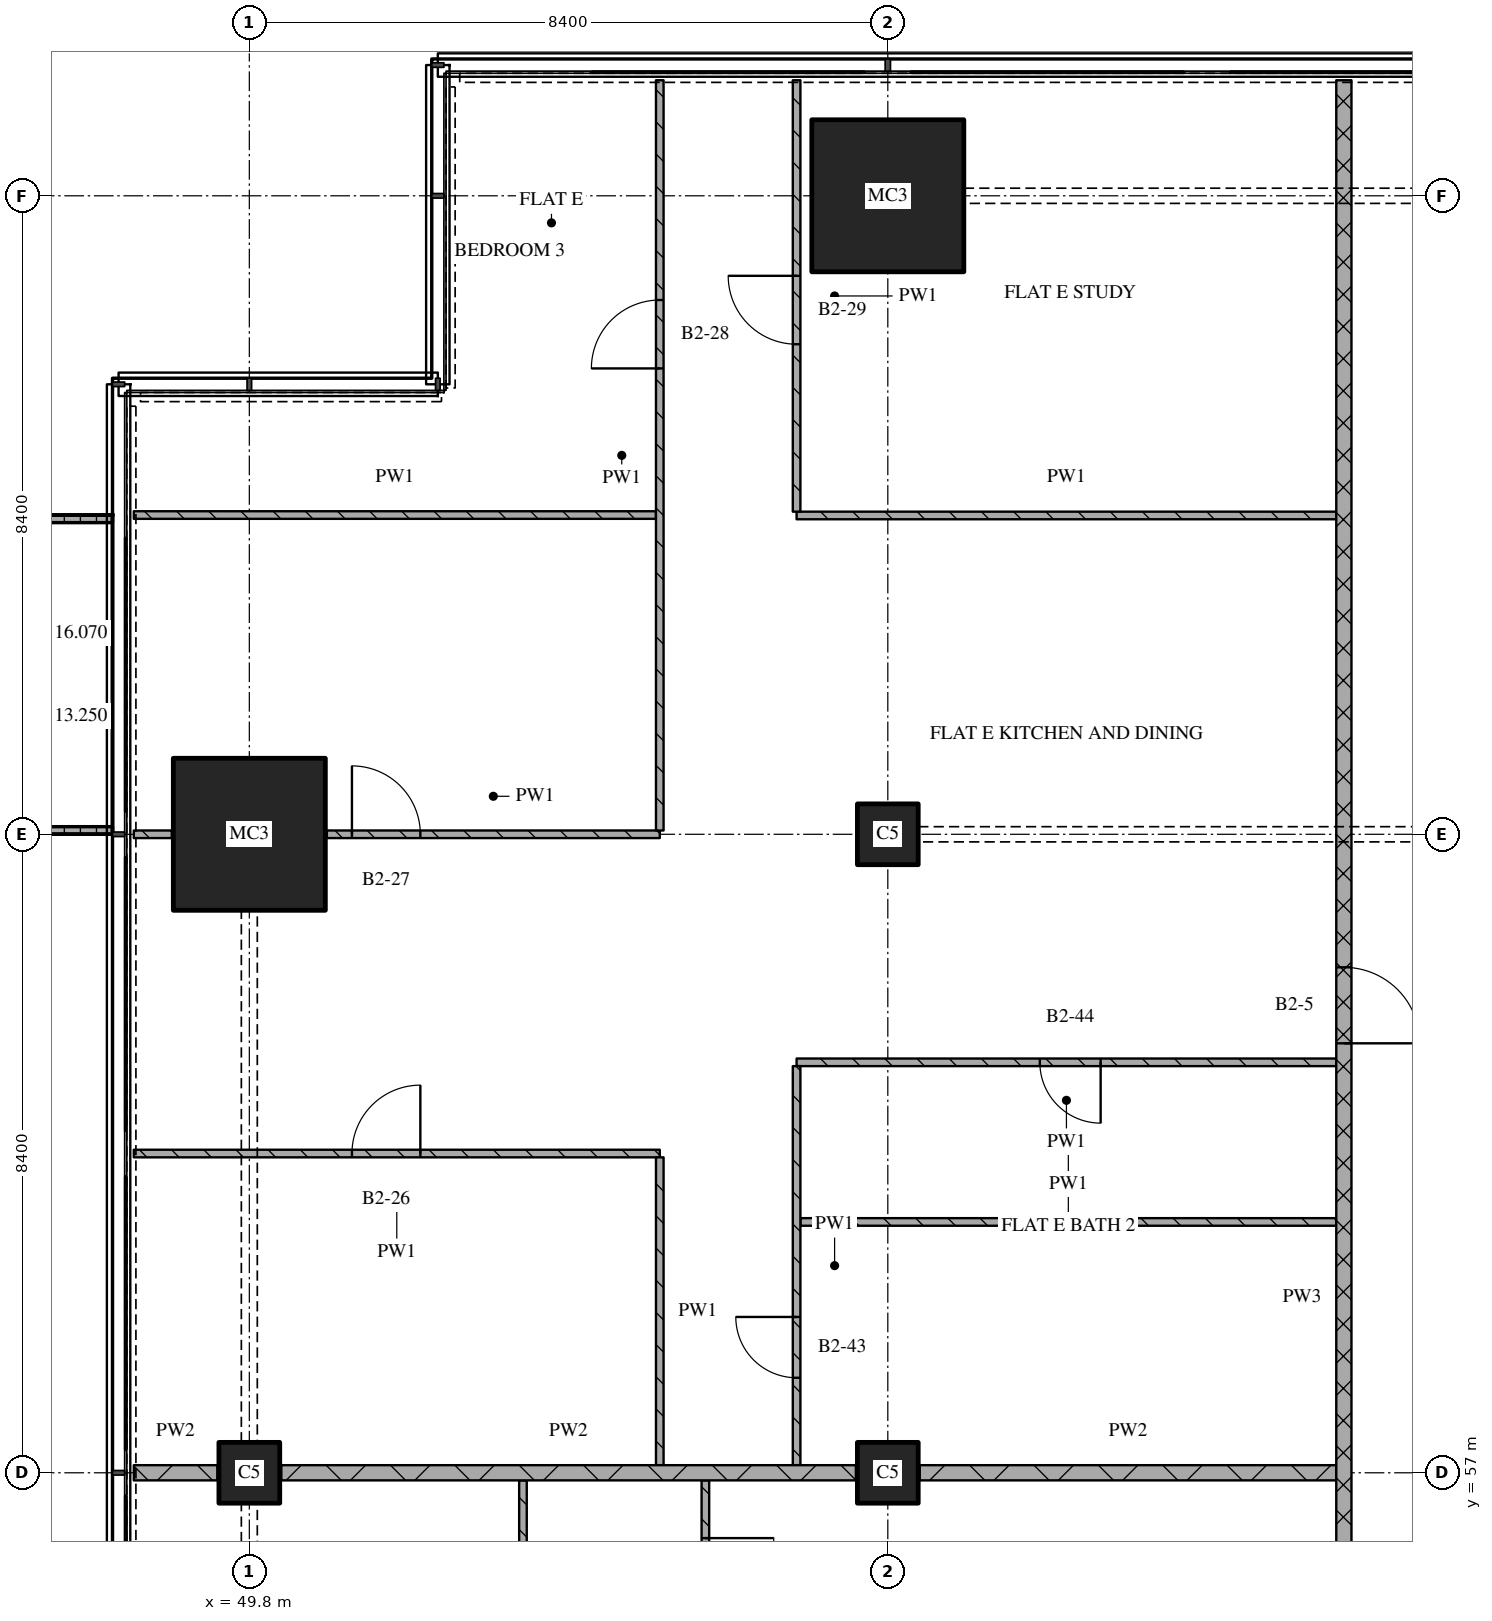
"""IFC4 building model, lengths in metres.
Left out: names, types, materials, properties, quantities, classifications, styles, units other than length and angle.
Written with IfcOpenShell. Run it as: python <this file> out.ifc"""

import sys

from ifc_helpers import new_model, si_unit, direction, frame, frame_2d, origin, origin_2d, place, context, subcontext, project, spatial, polyline, rectangle, outline, extrude, element, fill, save


model = new_model("IFC4")
c1 = context("Model", 3, precision=1e-05, world=origin(), true_north=direction((0.0, 1.0)))
c2 = subcontext(c1, "Body", "Model", "MODEL_VIEW")
j1 = project(units=[si_unit("LENGTHUNIT", "METRE"), si_unit("PLANEANGLEUNIT", "RADIAN")], contexts=[c1])
p1 = place(None, origin())
s1 = spatial("IfcSite", under=j1, at=p1, CompositionType="ELEMENT")
p2 = place(p1, origin())
s2 = spatial("IfcBuilding", under=s1, at=p2, CompositionType="ELEMENT")
p3 = place(p2, frame((0.0, 0.0, 113.25)))
s3 = spatial("IfcBuildingStorey", under=s2, at=p3, CompositionType="ELEMENT", Elevation=113.25)
p4 = place(p3, frame((49.8, 57.0, 0.0), z_axis=(0.0, 0.0, 1.0), x_axis=(1.0, 0.0, 0.0)))
e1 = element("IfcColumn", 1, at=p4, inside=s3, PredefinedType="COLUMN", context=c2, shape_type="SweptSolid", body=[
    extrude(rectangle(XDim=0.8, YDim=0.8, at=origin_2d()), origin(), (0.0, 0.0, 1.0), 3.6),
])
p5 = place(p3, frame((49.8, 65.4, 0.0), z_axis=(0.0, 0.0, 1.0), x_axis=(1.0, 0.0, 0.0)))
e2 = element("IfcColumn", 2, at=p5, inside=s3, PredefinedType="COLUMN", context=c2, shape_type="SweptSolid", body=[
    extrude(rectangle(XDim=2.0, YDim=2.0, at=origin_2d()), origin(), (0.0, 0.0, 1.0), 3.6),
])
for number, where, z_axis, x_axis in (
    (3, (58.2, 57.0, 0.0), (0.0, 0.0, 1.0), (1.0, 0.0, 0.0)),
    (4, (58.2, 65.4, 0.0), (0.0, 0.0, 1.0), (1.0, 0.0, 0.0)),
):
    element("IfcColumn", number, at=place(p3, frame(where, z_axis=z_axis, x_axis=x_axis)), inside=s3, PredefinedType="COLUMN", context=c2, shape_type="SweptSolid", body=[
        extrude(rectangle(XDim=0.8, YDim=0.8, at=origin_2d()), origin(), (0.0, 0.0, 1.0), 3.6),
    ])
p6 = place(p3, frame((58.2, 73.8, 0.0), z_axis=(0.0, 0.0, 1.0), x_axis=(1.0, 0.0, 0.0)))
e5 = element("IfcColumn", 5, at=p6, inside=s3, PredefinedType="COLUMN", context=c2, shape_type="SweptSolid", body=[
    extrude(rectangle(XDim=2.0, YDim=2.0, at=origin_2d()), origin(), (0.0, 0.0, 1.0), 3.6),
])
p7 = place(p3, origin())
e6 = element("IfcWall", 6, at=p7, inside=s3, PredefinedType="SOLIDWALL", context=c2, shape_type="SweptSolid", body=[
    extrude(outline(polyline([(48.0, 69.6), (48.0, 69.5), (46.367, 69.5), (46.367, 65.5), (48.0, 65.5), (48.0, 65.4), (46.267, 65.4), (46.267, 69.6), (48.0, 69.6)])), origin(), (0.0, 0.0, 1.0), 1.0),
])
p8 = place(p3, frame((48.28, 57.0, 0.0), z_axis=(0.0, 0.0, 1.0), x_axis=(1.0, 0.0, 0.0)))
e7 = element("IfcWall", 7, at=p8, inside=s3, PredefinedType="PARTITIONING", context=c2, shape_type="SweptSolid", body=[
    extrude(rectangle(XDim=1.1, YDim=0.2, at=frame_2d((0.55, 0.0))), origin(), (0.0, 0.0, 1.0), 3.32),
])
p9 = place(p3, frame((50.22, 57.0, 0.0), z_axis=(0.0, 0.0, 1.0), x_axis=(1.0, 0.0, 0.0)))
e8 = element("IfcWall", 8, at=p9, inside=s3, PredefinedType="PARTITIONING", context=c2, shape_type="SweptSolid", body=[
    extrude(rectangle(XDim=7.56, YDim=0.2, at=frame_2d((3.78, 0.0))), origin(), (0.0, 0.0, 1.0), 3.32),
])
p10 = place(p3, frame((58.62, 57.0, 0.0), z_axis=(0.0, 0.0, 1.0), x_axis=(1.0, 0.0, 0.0)))
e9 = element("IfcWall", 9, at=p10, inside=s3, PredefinedType="PARTITIONING", context=c2, shape_type="SweptSolid", body=[
    extrude(rectangle(XDim=5.48, YDim=0.2, at=frame_2d((2.74, 0.0))), origin(), (0.0, 0.0, 1.0), 3.32),
])
p11 = place(p3, frame((57.05, 60.3, 0.0), z_axis=(0.0, 0.0, 1.0), x_axis=(1.0, 0.0, 0.0)))
e10 = element("IfcWall", 10, at=p11, inside=s3, PredefinedType="PARTITIONING", context=c2, shape_type="SweptSolid", body=[
    extrude(rectangle(XDim=7.05, YDim=0.1, at=frame_2d((3.525, 0.0))), origin(), (0.0, 0.0, 1.0), 3.32),
])
p12 = place(p3, frame((55.2, 61.2, 0.0), z_axis=(0.0, 0.0, 1.0), x_axis=(-1.0, 0.0, 0.0)))
e11 = element("IfcWall", 11, at=p12, inside=s3, PredefinedType="PARTITIONING", context=c2, shape_type="SweptSolid", body=[
    extrude(rectangle(XDim=6.92, YDim=0.1, at=frame_2d((3.46, 0.0))), origin(), (0.0, 0.0, 1.0), 3.32),
])
p13 = place(p12, frame((3.15, 0.0, 0.0)))
e12 = element("IfcOpeningElement", 12, at=p13, cuts=e11, PredefinedType="OPENING", context=c2, shape_type="SweptSolid", body=[
    extrude(rectangle(XDim=0.9, YDim=2.1, at=frame_2d((0.45, 1.05))), frame((0.0, 0.06, 0.0), z_axis=(0.0, -1.0, 0.0), x_axis=(1.0, 0.0, 0.0)), (0.0, 0.0, 1.0), 0.12),
])
p14 = place(p3, frame((64.1, 62.4, 0.0), z_axis=(0.0, 0.0, 1.0), x_axis=(-1.0, 0.0, 0.0)))
e13 = element("IfcWall", 13, at=p14, inside=s3, PredefinedType="PARTITIONING", context=c2, shape_type="SweptSolid", body=[
    extrude(rectangle(XDim=7.1, YDim=0.1, at=frame_2d((3.55, 0.0))), origin(), (0.0, 0.0, 1.0), 3.32),
])
p15 = place(p14, frame((3.1, 0.0, 0.0)))
e14 = element("IfcOpeningElement", 14, at=p15, cuts=e13, PredefinedType="OPENING", context=c2, shape_type="SweptSolid", body=[
    extrude(rectangle(XDim=0.8, YDim=2.1, at=frame_2d((0.4, 1.05))), frame((0.0, 0.06, 0.0), z_axis=(0.0, -1.0, 0.0), x_axis=(1.0, 0.0, 0.0)), (0.0, 0.0, 1.0), 0.12),
])
p16 = place(p3, frame((48.28, 65.4, 0.0), z_axis=(0.0, 0.0, 1.0), x_axis=(1.0, 0.0, 0.0)))
e15 = element("IfcWall", 15, at=p16, inside=s3, PredefinedType="PARTITIONING", context=c2, shape_type="SweptSolid", body=[
    extrude(rectangle(XDim=0.5, YDim=0.1, at=frame_2d((0.25, 0.0))), origin(), (0.0, 0.0, 1.0), 3.32),
])
p17 = place(p3, frame((50.82, 65.4, 0.0), z_axis=(0.0, 0.0, 1.0), x_axis=(1.0, 0.0, 0.0)))
e16 = element("IfcWall", 16, at=p17, inside=s3, PredefinedType="PARTITIONING", context=c2, shape_type="SweptSolid", body=[
    extrude(rectangle(XDim=4.38, YDim=0.1, at=frame_2d((2.19, 0.0))), origin(), (0.0, 0.0, 1.0), 3.32),
])
p18 = place(p17, frame((0.33, 0.0, 0.0)))
e17 = element("IfcOpeningElement", 17, at=p18, cuts=e16, PredefinedType="OPENING", context=c2, shape_type="SweptSolid", body=[
    extrude(rectangle(XDim=0.9, YDim=2.1, at=frame_2d((0.45, 1.05))), frame((0.0, 0.06, 0.0), z_axis=(0.0, -1.0, 0.0), x_axis=(1.0, 0.0, 0.0)), (0.0, 0.0, 1.0), 0.12),
])
p19 = place(p3, frame((57.0, 69.594, 0.0), z_axis=(0.0, 0.0, 1.0), x_axis=(1.0, 0.0, 0.0)))
e18 = element("IfcWall", 18, at=p19, inside=s3, PredefinedType="PARTITIONING", context=c2, shape_type="SweptSolid", body=[
    extrude(rectangle(XDim=7.1, YDim=0.1, at=frame_2d((3.55, 0.0))), origin(), (0.0, 0.0, 1.0), 3.32),
])
p20 = place(p3, frame((48.28, 69.6, 0.0), z_axis=(0.0, 0.0, 1.0), x_axis=(1.0, 0.0, 0.0)))
e19 = element("IfcWall", 19, at=p20, inside=s3, PredefinedType="PARTITIONING", context=c2, shape_type="SweptSolid", body=[
    extrude(rectangle(XDim=6.87, YDim=0.1, at=frame_2d((3.435, 0.0))), origin(), (0.0, 0.0, 1.0), 3.32),
])
p21 = place(p3, frame((53.4, 56.9, 0.0), z_axis=(0.0, 0.0, 1.0), x_axis=(0.0, -1.0, 0.0)))
e20 = element("IfcWall", 20, at=p21, inside=s3, PredefinedType="PARTITIONING", context=c2, shape_type="SweptSolid", body=[
    extrude(rectangle(XDim=8.25, YDim=0.1, at=frame_2d((4.125, 0.0))), origin(), (0.0, 0.0, 1.0), 3.32),
])
p22 = place(p3, frame((55.2, 61.15, 0.0), z_axis=(0.0, 0.0, 1.0), x_axis=(0.0, -1.0, 0.0)))
e21 = element("IfcWall", 21, at=p22, inside=s3, PredefinedType="PARTITIONING", context=c2, shape_type="SweptSolid", body=[
    extrude(rectangle(XDim=4.05, YDim=0.1, at=frame_2d((2.025, 0.0))), origin(), (0.0, 0.0, 1.0), 3.32),
])
p23 = place(p3, frame((55.2, 65.45, 0.0), z_axis=(0.0, 0.0, 1.0), x_axis=(0.0, 1.0, 0.0)))
e22 = element("IfcWall", 22, at=p23, inside=s3, PredefinedType="PARTITIONING", context=c2, shape_type="SweptSolid", body=[
    extrude(rectangle(XDim=9.87, YDim=0.1, at=frame_2d((4.935, 0.0))), origin(), (0.0, 0.0, 1.0), 3.32),
])
p24 = place(p23, frame((6.079, 0.0, 0.0)))
e23 = element("IfcOpeningElement", 23, at=p24, cuts=e22, PredefinedType="OPENING", context=c2, shape_type="SweptSolid", body=[
    extrude(rectangle(XDim=0.9, YDim=2.1, at=frame_2d((0.45, 1.05))), frame((0.0, 0.06, 0.0), z_axis=(0.0, -1.0, 0.0), x_axis=(1.0, 0.0, 0.0)), (0.0, 0.0, 1.0), 0.12),
])
p25 = place(p3, frame((55.8, 56.9, 0.0), z_axis=(0.0, 0.0, 1.0), x_axis=(0.0, -1.0, 0.0)))
e24 = element("IfcWall", 24, at=p25, inside=s3, PredefinedType="PARTITIONING", context=c2, shape_type="SweptSolid", body=[
    extrude(rectangle(XDim=2.469, YDim=0.1, at=frame_2d((1.234, 0.0))), origin(), (0.0, 0.0, 1.0), 3.32),
])
p26 = place(p25, frame((0.76, 0.0, 0.0)))
e25 = element("IfcOpeningElement", 25, at=p26, cuts=e24, PredefinedType="OPENING", context=c2, shape_type="SweptSolid", body=[
    extrude(rectangle(XDim=0.9, YDim=2.1, at=frame_2d((0.45, 1.05))), frame((0.0, 0.06, 0.0), z_axis=(0.0, -1.0, 0.0), x_axis=(1.0, 0.0, 0.0)), (0.0, 0.0, 1.0), 0.12),
])
p27 = place(p3, frame((57.0, 62.35, 0.0), z_axis=(0.0, 0.0, 1.0), x_axis=(0.0, -1.0, 0.0)))
e26 = element("IfcWall", 26, at=p27, inside=s3, PredefinedType="PARTITIONING", context=c2, shape_type="SweptSolid", body=[
    extrude(rectangle(XDim=5.25, YDim=0.1, at=frame_2d((2.625, 0.0))), origin(), (0.0, 0.0, 1.0), 3.32),
])
p28 = place(p27, frame((3.3, 0.0, 0.0)))
e27 = element("IfcOpeningElement", 27, at=p28, cuts=e26, PredefinedType="OPENING", context=c2, shape_type="SweptSolid", body=[
    extrude(rectangle(XDim=0.8, YDim=2.1, at=frame_2d((0.4, 1.05))), frame((0.0, 0.06, 0.0), z_axis=(0.0, -1.0, 0.0), x_axis=(1.0, 0.0, 0.0)), (0.0, 0.0, 1.0), 0.12),
])
p29 = place(p3, frame((57.0, 75.32, 0.0), z_axis=(0.0, 0.0, 1.0), x_axis=(0.0, -1.0, 0.0)))
e28 = element("IfcWall", 28, at=p29, inside=s3, PredefinedType="PARTITIONING", context=c2, shape_type="SweptSolid", body=[
    extrude(rectangle(XDim=5.676, YDim=0.1, at=frame_2d((2.838, 0.0))), origin(), (0.0, 0.0, 1.0), 3.32),
])
p30 = place(p29, frame((2.573, 0.0, 0.0)))
e29 = element("IfcOpeningElement", 29, at=p30, cuts=e28, PredefinedType="OPENING", context=c2, shape_type="SweptSolid", body=[
    extrude(rectangle(XDim=0.9, YDim=2.1, at=frame_2d((0.45, 1.05))), frame((0.0, 0.06, 0.0), z_axis=(0.0, -1.0, 0.0), x_axis=(1.0, 0.0, 0.0)), (0.0, 0.0, 1.0), 0.12),
])
p31 = place(p3, frame((64.2, 43.3, 0.0), z_axis=(0.0, 0.0, 1.0), x_axis=(0.0, 1.0, 0.0)))
e30 = element("IfcWall", 30, at=p31, inside=s3, PredefinedType="PARTITIONING", context=c2, shape_type="SweptSolid", body=[
    extrude(rectangle(XDim=32.02, YDim=0.2, at=frame_2d((16.01, 0.0))), origin(), (0.0, 0.0, 1.0), 3.32),
])
p32 = place(p31, frame((4.95, 0.0, 0.0)))
e31 = element("IfcOpeningElement", 31, at=p32, cuts=e30, PredefinedType="OPENING", context=c2, shape_type="SweptSolid", body=[
    extrude(rectangle(XDim=1.0, YDim=2.1, at=frame_2d((0.5, 1.05))), frame((0.0, 0.11, 0.0), z_axis=(0.0, -1.0, 0.0), x_axis=(1.0, 0.0, 0.0)), (0.0, 0.0, 1.0), 0.22),
])
p33 = place(p31, frame((19.35, 0.0, 0.0)))
e32 = element("IfcOpeningElement", 32, at=p33, cuts=e30, PredefinedType="OPENING", context=c2, shape_type="SweptSolid", body=[
    extrude(rectangle(XDim=1.0, YDim=2.1, at=frame_2d((0.5, 1.05))), frame((0.0, 0.11, 0.0), z_axis=(0.0, -1.0, 0.0), x_axis=(1.0, 0.0, 0.0)), (0.0, 0.0, 1.0), 0.22),
])
p34 = place(p13, origin())
e33 = element("IfcDoor", 33, at=p34, inside=s3, OperationType="SINGLE_SWING_RIGHT", PredefinedType="DOOR", context=c2, shape_type="SweptSolid", body=[
    extrude(rectangle(XDim=0.9, YDim=2.1, at=frame_2d((0.45, 1.05))), frame((0.0, 0.025, 0.0), z_axis=(0.0, -1.0, 0.0), x_axis=(1.0, 0.0, 0.0)), (0.0, 0.0, 1.0), 0.05),
])
fill(e12, e33)
p35 = place(p15, origin())
e34 = element("IfcDoor", 34, at=p35, inside=s3, OperationType="SINGLE_SWING_LEFT", PredefinedType="DOOR", context=c2, shape_type="SweptSolid", body=[
    extrude(rectangle(XDim=0.8, YDim=2.1, at=frame_2d((0.4, 1.05))), frame((0.0, 0.025, 0.0), z_axis=(0.0, -1.0, 0.0), x_axis=(1.0, 0.0, 0.0)), (0.0, 0.0, 1.0), 0.05),
])
fill(e14, e34)
p36 = place(p18, origin())
e35 = element("IfcDoor", 35, at=p36, inside=s3, OperationType="SINGLE_SWING_LEFT", PredefinedType="DOOR", context=c2, shape_type="SweptSolid", body=[
    extrude(rectangle(XDim=0.9, YDim=2.1, at=frame_2d((0.45, 1.05))), frame((0.0, 0.025, 0.0), z_axis=(0.0, -1.0, 0.0), x_axis=(1.0, 0.0, 0.0)), (0.0, 0.0, 1.0), 0.05),
])
fill(e17, e35)
p37 = place(p24, origin())
e36 = element("IfcDoor", 36, at=p37, inside=s3, OperationType="SINGLE_SWING_LEFT", PredefinedType="DOOR", context=c2, shape_type="SweptSolid", body=[
    extrude(rectangle(XDim=0.9, YDim=2.1, at=frame_2d((0.45, 1.05))), frame((0.0, 0.025, 0.0), z_axis=(0.0, -1.0, 0.0), x_axis=(1.0, 0.0, 0.0)), (0.0, 0.0, 1.0), 0.05),
])
fill(e23, e36)
p38 = place(p26, origin())
e37 = element("IfcDoor", 37, at=p38, inside=s3, OperationType="SINGLE_SWING_LEFT", PredefinedType="DOOR", context=c2, shape_type="SweptSolid", body=[
    extrude(rectangle(XDim=0.9, YDim=2.1, at=frame_2d((0.45, 1.05))), frame((0.0, 0.025, 0.0), z_axis=(0.0, -1.0, 0.0), x_axis=(1.0, 0.0, 0.0)), (0.0, 0.0, 1.0), 0.05),
])
fill(e25, e37)
p39 = place(p28, origin())
e38 = element("IfcDoor", 38, at=p39, inside=s3, OperationType="SINGLE_SWING_RIGHT", PredefinedType="DOOR", context=c2, shape_type="SweptSolid", body=[
    extrude(rectangle(XDim=0.8, YDim=2.1, at=frame_2d((0.4, 1.05))), frame((0.0, 0.025, 0.0), z_axis=(0.0, -1.0, 0.0), x_axis=(1.0, 0.0, 0.0)), (0.0, 0.0, 1.0), 0.05),
])
fill(e27, e38)
p40 = place(p30, origin())
e39 = element("IfcDoor", 39, at=p40, inside=s3, OperationType="SINGLE_SWING_RIGHT", PredefinedType="DOOR", context=c2, shape_type="SweptSolid", body=[
    extrude(rectangle(XDim=0.9, YDim=2.1, at=frame_2d((0.45, 1.05))), frame((0.0, 0.025, 0.0), z_axis=(0.0, -1.0, 0.0), x_axis=(1.0, 0.0, 0.0)), (0.0, 0.0, 1.0), 0.05),
])
fill(e29, e39)
p41 = place(p33, origin())
e40 = element("IfcDoor", 40, at=p41, inside=s3, OperationType="SINGLE_SWING_RIGHT", PredefinedType="DOOR", context=c2, shape_type="SweptSolid", body=[
    extrude(rectangle(XDim=1.0, YDim=2.1, at=frame_2d((0.5, 1.05))), frame((0.0, 0.025, 0.0), z_axis=(0.0, -1.0, 0.0), x_axis=(1.0, 0.0, 0.0)), (0.0, 0.0, 1.0), 0.05),
])
fill(e32, e40)
save(model, sys.argv[1])
